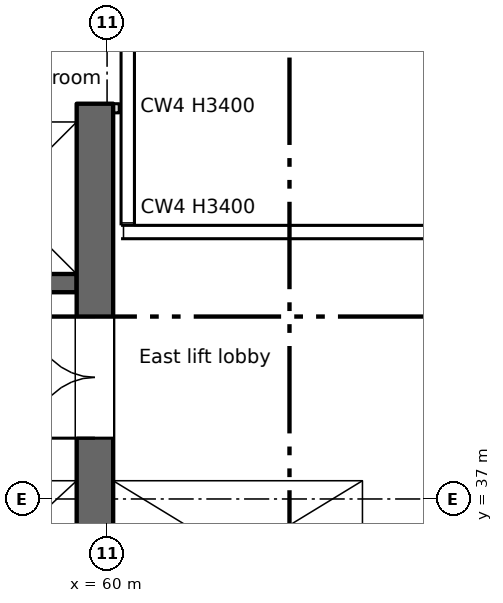
"""IFC4 building model, lengths in metres.
Left out: names, types, materials, properties, quantities, classifications, styles, units other than length and angle.
Written with IfcOpenShell. Run it as: python <this file> out.ifc"""

import sys

from ifc_helpers import new_model, si_unit, direction, frame, frame_2d, origin, place, context, subcontext, project, spatial, rectangle, extrude, element, fill, save


model = new_model("IFC4")
c1 = context("Model", 3, precision=1e-05, world=origin(), true_north=direction((0.0, 1.0)))
c2 = subcontext(c1, "Body", "Model", "MODEL_VIEW")
j1 = project(units=[si_unit("LENGTHUNIT", "METRE"), si_unit("PLANEANGLEUNIT", "RADIAN")], contexts=[c1])
p1 = place(None, origin())
s1 = spatial("IfcSite", under=j1, at=p1, CompositionType="ELEMENT")
p2 = place(p1, origin())
s2 = spatial("IfcBuilding", under=s1, at=p2, CompositionType="ELEMENT")
p3 = place(p2, frame((0.0, 0.0, 235.55)))
s3 = spatial("IfcBuildingStorey", under=s2, at=p3, CompositionType="ELEMENT", Elevation=235.55)
p4 = place(p3, frame((64.35, 34.8, 0.0), z_axis=(0.0, 0.0, 1.0), x_axis=(0.0, 1.0, 0.0)))
e1 = element("IfcWall", 1, at=p4, inside=s3, PredefinedType="SHEAR", context=c2, shape_type="SweptSolid", body=[
    extrude(rectangle(XDim=6.45, YDim=0.3, at=frame_2d((3.225, 0.0))), origin(), (0.0, 0.0, 1.0), 3.4),
])
p5 = place(p3, frame((59.8, 28.4, 0.0), z_axis=(0.0, 0.0, 1.0), x_axis=(0.0, 1.0, 0.0)))
e2 = element("IfcWall", 2, at=p5, inside=s3, PredefinedType="SHEAR", context=c2, shape_type="SweptSolid", body=[
    extrude(rectangle(XDim=15.1, YDim=0.6, at=frame_2d((7.55, 0.0))), origin(), (0.0, 0.0, 1.0), 3.4),
])
p6 = place(p5, frame((9.6, 0.0, 0.0)))
e3 = element("IfcOpeningElement", 3, at=p6, cuts=e2, PredefinedType="OPENING", context=c2, shape_type="SweptSolid", body=[
    extrude(rectangle(XDim=2.0, YDim=2.1, at=frame_2d((1.0, 1.05))), frame((0.0, 0.31, 0.0), z_axis=(0.0, -1.0, 0.0), x_axis=(1.0, 0.0, 0.0)), (0.0, 0.0, 1.0), 0.62),
])
p7 = place(p3, frame((47.3, 37.45, 0.0), z_axis=(0.0, 0.0, 1.0), x_axis=(1.0, 0.0, 0.0)))
e4 = element("IfcWall", 4, at=p7, inside=s3, PredefinedType="SHEAR", context=c2, shape_type="SweptSolid", body=[
    extrude(rectangle(XDim=12.2, YDim=0.3, at=frame_2d((6.1, 0.0))), origin(), (0.0, 0.0, 1.0), 3.4),
])
p8 = place(p7, frame((4.3, 0.0, 0.0)))
e5 = element("IfcOpeningElement", 5, at=p8, cuts=e4, PredefinedType="OPENING", context=c2, shape_type="SweptSolid", body=[
    extrude(rectangle(XDim=1.1, YDim=2.1, at=frame_2d((0.55, 1.05))), frame((0.0, 0.16, 0.0), z_axis=(0.0, -1.0, 0.0), x_axis=(1.0, 0.0, 0.0)), (0.0, 0.0, 1.0), 0.32),
])
p9 = place(p7, frame((7.3, 0.0, 0.0)))
e6 = element("IfcOpeningElement", 6, at=p9, cuts=e4, PredefinedType="OPENING", context=c2, shape_type="SweptSolid", body=[
    extrude(rectangle(XDim=1.1, YDim=2.1, at=frame_2d((0.55, 1.05))), frame((0.0, 0.16, 0.0), z_axis=(0.0, -1.0, 0.0), x_axis=(1.0, 0.0, 0.0)), (0.0, 0.0, 1.0), 0.32),
])
p10 = place(p7, frame((10.3, 0.0, 0.0)))
e7 = element("IfcOpeningElement", 7, at=p10, cuts=e4, PredefinedType="OPENING", context=c2, shape_type="SweptSolid", body=[
    extrude(rectangle(XDim=1.1, YDim=2.1, at=frame_2d((0.55, 1.05))), frame((0.0, 0.16, 0.0), z_axis=(0.0, -1.0, 0.0), x_axis=(1.0, 0.0, 0.0)), (0.0, 0.0, 1.0), 0.32),
])
p11 = place(p3, frame((60.1, 37.45, 0.0), z_axis=(0.0, 0.0, 1.0), x_axis=(1.0, 0.0, 0.0)))
e8 = element("IfcWall", 8, at=p11, inside=s3, PredefinedType="SHEAR", context=c2, shape_type="SweptSolid", body=[
    extrude(rectangle(XDim=4.1, YDim=0.3, at=frame_2d((2.05, 0.0))), origin(), (0.0, 0.0, 1.0), 3.4),
])
p12 = place(p11, frame((1.5, 0.0, 0.0)))
e9 = element("IfcOpeningElement", 9, at=p12, cuts=e8, PredefinedType="OPENING", context=c2, shape_type="SweptSolid", body=[
    extrude(rectangle(XDim=1.1, YDim=2.1, at=frame_2d((0.55, 1.05))), frame((0.0, 0.16, 0.0), z_axis=(0.0, -1.0, 0.0), x_axis=(1.0, 0.0, 0.0)), (0.0, 0.0, 1.0), 0.32),
])
p13 = place(p3, frame((18.5, 40.55, 0.0), z_axis=(0.0, 0.0, 1.0), x_axis=(1.0, 0.0, 0.0)))
e10 = element("IfcWall", 10, at=p13, inside=s3, PredefinedType="SHEAR", context=c2, shape_type="SweptSolid", body=[
    extrude(rectangle(XDim=41.0, YDim=0.3, at=frame_2d((20.5, 0.0))), origin(), (0.0, 0.0, 1.0), 3.4),
])
p14 = place(p13, frame((2.15, 0.0, 0.0)))
e11 = element("IfcOpeningElement", 11, at=p14, cuts=e10, PredefinedType="OPENING", context=c2, shape_type="SweptSolid", body=[
    extrude(rectangle(XDim=0.9, YDim=2.1, at=frame_2d((0.45, 1.05))), frame((0.0, 0.16, 0.0), z_axis=(0.0, -1.0, 0.0), x_axis=(1.0, 0.0, 0.0)), (0.0, 0.0, 1.0), 0.32),
])
p15 = place(p13, frame((15.9, 0.0, 0.0)))
e12 = element("IfcOpeningElement", 12, at=p15, cuts=e10, PredefinedType="OPENING", context=c2, shape_type="SweptSolid", body=[
    extrude(rectangle(XDim=0.9, YDim=2.1, at=frame_2d((0.45, 1.05))), frame((0.0, 0.16, 0.0), z_axis=(0.0, -1.0, 0.0), x_axis=(1.0, 0.0, 0.0)), (0.0, 0.0, 1.0), 0.32),
])
p16 = place(p13, frame((21.4, 0.0, 0.0)))
e13 = element("IfcOpeningElement", 13, at=p16, cuts=e10, PredefinedType="OPENING", context=c2, shape_type="SweptSolid", body=[
    extrude(rectangle(XDim=0.9, YDim=2.1, at=frame_2d((0.45, 1.05))), frame((0.0, 0.16, 0.0), z_axis=(0.0, -1.0, 0.0), x_axis=(1.0, 0.0, 0.0)), (0.0, 0.0, 1.0), 0.32),
])
p17 = place(p13, frame((26.9, 0.0, 0.0)))
e14 = element("IfcOpeningElement", 14, at=p17, cuts=e10, PredefinedType="OPENING", context=c2, shape_type="SweptSolid", body=[
    extrude(rectangle(XDim=0.9, YDim=2.1, at=frame_2d((0.45, 1.05))), frame((0.0, 0.16, 0.0), z_axis=(0.0, -1.0, 0.0), x_axis=(1.0, 0.0, 0.0)), (0.0, 0.0, 1.0), 0.32),
])
p18 = place(p13, frame((6.175, 0.0, 0.0)))
e15 = element("IfcOpeningElement", 15, at=p18, cuts=e10, PredefinedType="OPENING", context=c2, shape_type="SweptSolid", body=[
    extrude(rectangle(XDim=1.1, YDim=2.1, at=frame_2d((0.55, 1.05))), frame((0.0, 0.16, 0.0), z_axis=(0.0, -1.0, 0.0), x_axis=(1.0, 0.0, 0.0)), (0.0, 0.0, 1.0), 0.32),
])
p19 = place(p13, frame((8.925, 0.0, 0.0)))
e16 = element("IfcOpeningElement", 16, at=p19, cuts=e10, PredefinedType="OPENING", context=c2, shape_type="SweptSolid", body=[
    extrude(rectangle(XDim=1.1, YDim=2.1, at=frame_2d((0.55, 1.05))), frame((0.0, 0.16, 0.0), z_axis=(0.0, -1.0, 0.0), x_axis=(1.0, 0.0, 0.0)), (0.0, 0.0, 1.0), 0.32),
])
p20 = place(p13, frame((11.675, 0.0, 0.0)))
e17 = element("IfcOpeningElement", 17, at=p20, cuts=e10, PredefinedType="OPENING", context=c2, shape_type="SweptSolid", body=[
    extrude(rectangle(XDim=1.1, YDim=2.1, at=frame_2d((0.55, 1.05))), frame((0.0, 0.16, 0.0), z_axis=(0.0, -1.0, 0.0), x_axis=(1.0, 0.0, 0.0)), (0.0, 0.0, 1.0), 0.32),
])
p21 = place(p13, frame((30.925, 0.0, 0.0)))
e18 = element("IfcOpeningElement", 18, at=p21, cuts=e10, PredefinedType="OPENING", context=c2, shape_type="SweptSolid", body=[
    extrude(rectangle(XDim=1.1, YDim=2.1, at=frame_2d((0.55, 1.05))), frame((0.0, 0.16, 0.0), z_axis=(0.0, -1.0, 0.0), x_axis=(1.0, 0.0, 0.0)), (0.0, 0.0, 1.0), 0.32),
])
p22 = place(p13, frame((33.675, 0.0, 0.0)))
e19 = element("IfcOpeningElement", 19, at=p22, cuts=e10, PredefinedType="OPENING", context=c2, shape_type="SweptSolid", body=[
    extrude(rectangle(XDim=1.1, YDim=2.1, at=frame_2d((0.55, 1.05))), frame((0.0, 0.16, 0.0), z_axis=(0.0, -1.0, 0.0), x_axis=(1.0, 0.0, 0.0)), (0.0, 0.0, 1.0), 0.32),
])
p23 = place(p13, frame((36.375, 0.0, 0.0)))
e20 = element("IfcOpeningElement", 20, at=p23, cuts=e10, PredefinedType="OPENING", context=c2, shape_type="SweptSolid", body=[
    extrude(rectangle(XDim=1.2, YDim=2.1, at=frame_2d((0.6, 1.05))), frame((0.0, 0.16, 0.0), z_axis=(0.0, -1.0, 0.0), x_axis=(1.0, 0.0, 0.0)), (0.0, 0.0, 1.0), 0.32),
])
p24 = place(p13, frame((39.15, 0.0, 0.0)))
e21 = element("IfcOpeningElement", 21, at=p24, cuts=e10, PredefinedType="OPENING", context=c2, shape_type="SweptSolid", body=[
    extrude(rectangle(XDim=1.2, YDim=2.1, at=frame_2d((0.6, 1.05))), frame((0.0, 0.16, 0.0), z_axis=(0.0, -1.0, 0.0), x_axis=(1.0, 0.0, 0.0)), (0.0, 0.0, 1.0), 0.32),
])
p25 = place(p3, frame((18.5, 43.35, 0.0), z_axis=(0.0, 0.0, 1.0), x_axis=(1.0, 0.0, 0.0)))
e22 = element("IfcWall", 22, at=p25, inside=s3, PredefinedType="SHEAR", context=c2, shape_type="SweptSolid", body=[
    extrude(rectangle(XDim=41.0, YDim=0.3, at=frame_2d((20.5, 0.0))), origin(), (0.0, 0.0, 1.0), 3.4),
])
p26 = place(p3, frame((60.15, 43.35, 0.0), z_axis=(0.0, 0.0, 1.0), x_axis=(0.0, 1.0, 0.0)))
e23 = element("IfcWall", 23, at=p26, inside=s3, PredefinedType="PARTITIONING", context=c2, shape_type="SweptSolid", body=[
    extrude(rectangle(XDim=0.15, YDim=0.1, at=frame_2d((0.075, 0.0))), origin(), (0.0, 0.0, 1.0), 3.4),
])
p27 = place(p12, origin())
e24 = element("IfcDoor", 24, at=p27, inside=s3, OperationType="SLIDING_TO_LEFT", PredefinedType="DOOR", context=c2, shape_type="SweptSolid", body=[
    extrude(rectangle(XDim=1.1, YDim=2.1, at=frame_2d((0.55, 1.05))), frame((0.0, 0.025, 0.0), z_axis=(0.0, -1.0, 0.0), x_axis=(1.0, 0.0, 0.0)), (0.0, 0.0, 1.0), 0.05),
])
fill(e9, e24)
p28 = place(p6, origin())
e25 = element("IfcDoor", 25, at=p28, inside=s3, OperationType="DOUBLE_DOOR_SINGLE_SWING", PredefinedType="DOOR", context=c2, shape_type="SweptSolid", body=[
    extrude(rectangle(XDim=2.0, YDim=2.1, at=frame_2d((1.0, 1.05))), frame((0.0, 0.025, 0.0), z_axis=(0.0, -1.0, 0.0), x_axis=(1.0, 0.0, 0.0)), (0.0, 0.0, 1.0), 0.05),
])
fill(e3, e25)
save(model, sys.argv[1])
